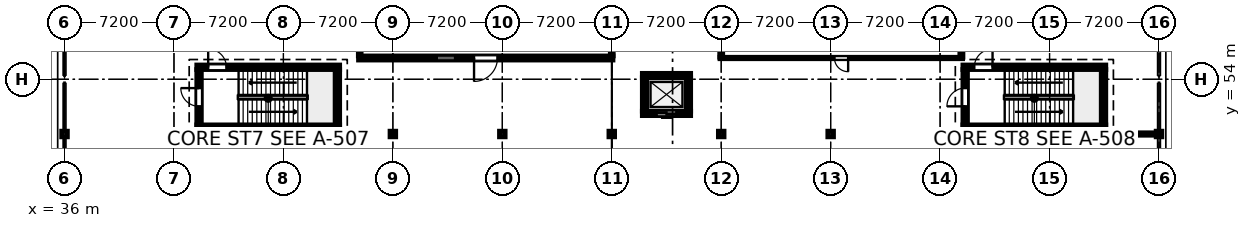
"""IFC4 building model, lengths in metres.
Left out: names, types, materials, properties, quantities, classifications, styles, units other than length and angle.
Written with IfcOpenShell. Run it as: python <this file> out.ifc"""

import sys

from ifc_helpers import new_model, si_unit, direction, frame, frame_2d, origin, origin_2d, place, context, subcontext, project, spatial, rectangle, i_section, extrude, element, fill, save


model = new_model("IFC4")
c1 = context("Model", 3, precision=1e-05, world=origin(), true_north=direction((0.0, 1.0)))
c2 = subcontext(c1, "Body", "Model", "MODEL_VIEW")
j1 = project(units=[si_unit("LENGTHUNIT", "METRE"), si_unit("PLANEANGLEUNIT", "RADIAN")], contexts=[c1])
p1 = place(None, origin())
s1 = spatial("IfcSite", under=j1, at=p1, CompositionType="ELEMENT")
p2 = place(p1, origin())
s2 = spatial("IfcBuilding", under=s1, at=p2, CompositionType="ELEMENT")
p3 = place(p2, origin())
s3 = spatial("IfcBuildingStorey", under=s2, at=p3, CompositionType="ELEMENT", Elevation=0.0)
for number, where, z_axis, x_axis in (
    (1, (36.0, 50.4, 0.0), (0.0, 0.0, 1.0), (1.0, 0.0, 0.0)),
    (2, (43.2, 50.4, 0.0), (0.0, 0.0, 1.0), (1.0, 0.0, 0.0)),
    (3, (50.4, 50.4, 0.0), (0.0, 0.0, 1.0), (1.0, 0.0, 0.0)),
    (4, (57.6, 50.4, 0.0), (0.0, 0.0, 1.0), (1.0, 0.0, 0.0)),
    (5, (64.8, 50.4, 0.0), (0.0, 0.0, 1.0), (1.0, 0.0, 0.0)),
    (6, (72.0, 50.4, 0.0), (0.0, 0.0, 1.0), (1.0, 0.0, 0.0)),
    (7, (79.2, 50.4, 0.0), (0.0, 0.0, 1.0), (1.0, 0.0, 0.0)),
    (8, (86.4, 50.4, 0.0), (0.0, 0.0, 1.0), (1.0, 0.0, 0.0)),
    (9, (93.6, 50.4, 0.0), (0.0, 0.0, 1.0), (1.0, 0.0, 0.0)),
    (10, (100.8, 50.4, 0.0), (0.0, 0.0, 1.0), (1.0, 0.0, 0.0)),
    (11, (108.0, 50.4, 0.0), (0.0, 0.0, 1.0), (1.0, 0.0, 0.0)),
):
    element("IfcColumn", number, at=place(p3, frame(where, z_axis=z_axis, x_axis=x_axis)), inside=s3, PredefinedType="COLUMN", context=c2, shape_type="SweptSolid", body=[
        extrude(i_section(OverallWidth=0.373, OverallDepth=0.373, WebThickness=0.016, FlangeThickness=0.026, FilletRadius=0.015, at=origin_2d()), origin(), (0.0, 0.0, 1.0), 5.4),
    ])
p4 = place(p3, frame((54.1, 50.85, 0.0), z_axis=(0.0, 0.0, 1.0), x_axis=(-1.0, 0.0, 0.0)))
e12 = element("IfcWall", 12, at=p4, inside=s3, PredefinedType="SOLIDWALL", context=c2, shape_type="SweptSolid", body=[
    extrude(rectangle(XDim=9.4, YDim=0.3, at=frame_2d((4.7, 0.0))), origin(), (0.0, 0.0, 1.0), 5.18),
])
p5 = place(p3, frame((44.7, 54.79, 0.0), z_axis=(0.0, 0.0, 1.0), x_axis=(1.0, 0.0, 0.0)))
e13 = element("IfcWall", 13, at=p5, inside=s3, PredefinedType="SOLIDWALL", context=c2, shape_type="SweptSolid", body=[
    extrude(rectangle(XDim=9.4, YDim=0.3, at=frame_2d((4.7, 0.0))), origin(), (0.0, 0.0, 1.0), 5.18),
])
p6 = place(p5, frame((0.75, 0.0, 0.0)))
e14 = element("IfcOpeningElement", 14, at=p6, cuts=e13, PredefinedType="OPENING", context=c2, shape_type="SweptSolid", body=[
    extrude(rectangle(XDim=1.2, YDim=2.2, at=frame_2d((0.6, 1.1))), frame((0.0, 0.16, 0.0), z_axis=(0.0, -1.0, 0.0), x_axis=(1.0, 0.0, 0.0)), (0.0, 0.0, 1.0), 0.32),
])
p7 = place(p3, frame((44.85, 51.0, 0.0), z_axis=(0.0, 0.0, 1.0), x_axis=(0.0, 1.0, 0.0)))
e15 = element("IfcWall", 15, at=p7, inside=s3, PredefinedType="SOLIDWALL", context=c2, shape_type="SweptSolid", body=[
    extrude(rectangle(XDim=3.64, YDim=0.3, at=frame_2d((1.82, 0.0))), origin(), (0.0, 0.0, 1.0), 5.18),
])
p8 = place(p7, frame((1.22, 0.0, 0.0)))
e16 = element("IfcOpeningElement", 16, at=p8, cuts=e15, PredefinedType="OPENING", context=c2, shape_type="SweptSolid", body=[
    extrude(rectangle(XDim=1.2, YDim=2.2, at=frame_2d((0.6, 1.1))), frame((0.0, 0.16, 0.0), z_axis=(0.0, -1.0, 0.0), x_axis=(1.0, 0.0, 0.0)), (0.0, 0.0, 1.0), 0.32),
])
p9 = place(p3, frame((53.95, 54.64, 0.0), z_axis=(0.0, 0.0, 1.0), x_axis=(0.0, -1.0, 0.0)))
e17 = element("IfcWall", 17, at=p9, inside=s3, PredefinedType="SOLIDWALL", context=c2, shape_type="SweptSolid", body=[
    extrude(rectangle(XDim=3.64, YDim=0.3, at=frame_2d((1.82, 0.0))), origin(), (0.0, 0.0, 1.0), 5.18),
])
p10 = place(p3, frame((104.5, 50.85, 0.0), z_axis=(0.0, 0.0, 1.0), x_axis=(-1.0, 0.0, 0.0)))
e18 = element("IfcWall", 18, at=p10, inside=s3, PredefinedType="SOLIDWALL", context=c2, shape_type="SweptSolid", body=[
    extrude(rectangle(XDim=9.4, YDim=0.3, at=frame_2d((4.7, 0.0))), origin(), (0.0, 0.0, 1.0), 5.18),
])
p11 = place(p3, frame((95.1, 54.79, 0.0), z_axis=(0.0, 0.0, 1.0), x_axis=(1.0, 0.0, 0.0)))
e19 = element("IfcWall", 19, at=p11, inside=s3, PredefinedType="SOLIDWALL", context=c2, shape_type="SweptSolid", body=[
    extrude(rectangle(XDim=9.4, YDim=0.3, at=frame_2d((4.7, 0.0))), origin(), (0.0, 0.0, 1.0), 5.18),
])
p12 = place(p11, frame((0.75, 0.0, 0.0)))
e20 = element("IfcOpeningElement", 20, at=p12, cuts=e19, PredefinedType="OPENING", context=c2, shape_type="SweptSolid", body=[
    extrude(rectangle(XDim=1.2, YDim=2.2, at=frame_2d((0.6, 1.1))), frame((0.0, 0.16, 0.0), z_axis=(0.0, -1.0, 0.0), x_axis=(1.0, 0.0, 0.0)), (0.0, 0.0, 1.0), 0.32),
])
p13 = place(p3, frame((95.25, 51.0, 0.0), z_axis=(0.0, 0.0, 1.0), x_axis=(0.0, 1.0, 0.0)))
e21 = element("IfcWall", 21, at=p13, inside=s3, PredefinedType="SOLIDWALL", context=c2, shape_type="SweptSolid", body=[
    extrude(rectangle(XDim=3.64, YDim=0.3, at=frame_2d((1.82, 0.0))), origin(), (0.0, 0.0, 1.0), 5.18),
])
p14 = place(p13, frame((1.22, 0.0, 0.0)))
e22 = element("IfcOpeningElement", 22, at=p14, cuts=e21, PredefinedType="OPENING", context=c2, shape_type="SweptSolid", body=[
    extrude(rectangle(XDim=1.2, YDim=2.2, at=frame_2d((0.6, 1.1))), frame((0.0, 0.16, 0.0), z_axis=(0.0, -1.0, 0.0), x_axis=(1.0, 0.0, 0.0)), (0.0, 0.0, 1.0), 0.32),
])
p15 = place(p3, frame((104.35, 54.64, 0.0), z_axis=(0.0, 0.0, 1.0), x_axis=(0.0, -1.0, 0.0)))
e23 = element("IfcWall", 23, at=p15, inside=s3, PredefinedType="SOLIDWALL", context=c2, shape_type="SweptSolid", body=[
    extrude(rectangle(XDim=3.64, YDim=0.3, at=frame_2d((1.82, 0.0))), origin(), (0.0, 0.0, 1.0), 5.18),
])
p16 = place(p3, frame((77.19, 51.755, 0.0), z_axis=(0.0, 0.0, 1.0), x_axis=(-1.0, 0.0, 0.0)))
e24 = element("IfcWall", 24, at=p16, inside=s3, PredefinedType="SHEAR", context=c2, shape_type="SweptSolid", body=[
    extrude(rectangle(XDim=3.18, YDim=0.29, at=frame_2d((1.59, 0.0))), origin(), (0.0, 0.0, 1.0), 5.18),
])
p17 = place(p16, frame((0.94, 0.0, 0.0)))
e25 = element("IfcOpeningElement", 25, at=p17, cuts=e24, PredefinedType="OPENING", context=c2, shape_type="SweptSolid", body=[
    extrude(rectangle(XDim=1.3, YDim=2.2, at=frame_2d((0.65, 1.1))), frame((0.0, 0.155, 0.0), z_axis=(0.0, -1.0, 0.0), x_axis=(1.0, 0.0, 0.0)), (0.0, 0.0, 1.0), 0.31),
])
p18 = place(p3, frame((74.01, 54.245, 0.0), z_axis=(0.0, 0.0, 1.0), x_axis=(1.0, 0.0, 0.0)))
e26 = element("IfcWall", 26, at=p18, inside=s3, PredefinedType="SHEAR", context=c2, shape_type="SweptSolid", body=[
    extrude(rectangle(XDim=3.18, YDim=0.29, at=frame_2d((1.59, 0.0))), origin(), (0.0, 0.0, 1.0), 5.18),
])
for number, where, z_axis, x_axis in (
    (27, (74.155, 51.9, 0.0), (0.0, 0.0, 1.0), (0.0, 1.0, 0.0)),
    (28, (77.045, 54.1, 0.0), (0.0, 0.0, 1.0), (0.0, -1.0, 0.0)),
):
    element("IfcWall", number, at=place(p3, frame(where, z_axis=z_axis, x_axis=x_axis)), inside=s3, PredefinedType="SHEAR", context=c2, shape_type="SweptSolid", body=[
        extrude(rectangle(XDim=2.2, YDim=0.29, at=frame_2d((1.1, 0.0))), origin(), (0.0, 0.0, 1.0), 5.18),
    ])
p19 = place(p3, frame((72.08, 55.4, 0.0), z_axis=(0.0, 0.0, 1.0), x_axis=(-1.0, 0.0, 0.0)))
e29 = element("IfcWall", 29, at=p19, inside=s3, PredefinedType="PARTITIONING", context=c2, shape_type="SweptSolid", body=[
    extrude(rectangle(XDim=16.74, YDim=0.27, at=frame_2d((8.37, 0.0))), origin(), (0.0, 0.0, 1.0), 4.477),
])
p20 = place(p19, frame((7.6, 0.0, 0.0)))
e30 = element("IfcOpeningElement", 30, at=p20, cuts=e29, PredefinedType="OPENING", context=c2, shape_type="SweptSolid", body=[
    extrude(rectangle(XDim=1.54, YDim=2.1, at=frame_2d((0.77, 1.05))), frame((0.0, 0.145, 0.0), z_axis=(0.0, -1.0, 0.0), x_axis=(1.0, 0.0, 0.0)), (0.0, 0.0, 1.0), 0.29),
])
p21 = place(p19, frame((10.39, 0.0, 0.95)))
e31 = element("IfcOpeningElement", 31, at=p21, cuts=e29, PredefinedType="OPENING", context=c2, shape_type="SweptSolid", body=[
    extrude(rectangle(XDim=1.2, YDim=1.0, at=frame_2d((0.6, 0.5))), frame((0.0, 0.145, 0.0), z_axis=(0.0, -1.0, 0.0), x_axis=(1.0, 0.0, 0.0)), (0.0, 0.0, 1.0), 0.29),
])
p22 = place(p3, frame((95.08, 55.4, 0.0), z_axis=(0.0, 0.0, 1.0), x_axis=(-1.0, 0.0, 0.0)))
e32 = element("IfcWall", 32, at=p22, inside=s3, PredefinedType="PARTITIONING", context=c2, shape_type="SweptSolid", body=[
    extrude(rectangle(XDim=15.96, YDim=0.095, at=frame_2d((7.98, 0.0))), origin(), (0.0, 0.0, 1.0), 4.477),
])
p23 = place(p22, frame((7.53, 0.0, 0.0)))
e33 = element("IfcOpeningElement", 33, at=p23, cuts=e32, PredefinedType="OPENING", context=c2, shape_type="SweptSolid", body=[
    extrude(rectangle(XDim=0.9, YDim=2.16, at=frame_2d((0.45, 1.08))), frame((0.0, 0.057, 0.0), z_axis=(0.0, -1.0, 0.0), x_axis=(1.0, 0.0, 0.0)), (0.0, 0.0, 1.0), 0.115),
])
p24 = place(p3, frame((100.72, 50.4, 0.0), z_axis=(0.0, 0.0, 1.0), x_axis=(1.0, 0.0, 0.0)))
e34 = element("IfcWall", 34, at=p24, inside=s3, PredefinedType="PARTITIONING", context=c2, shape_type="SweptSolid", body=[
    extrude(rectangle(XDim=7.198, YDim=0.16, at=frame_2d((3.599, 0.0))), origin(), (0.0, 0.0, 1.0), 4.477),
])
p25 = place(p3, frame((100.8, 18.08, 0.0), z_axis=(0.0, 0.0, 1.0), x_axis=(0.0, 1.0, 0.0)))
e35 = element("IfcWall", 35, at=p25, inside=s3, PredefinedType="PARTITIONING", context=c2, shape_type="SweptSolid", body=[
    extrude(rectangle(XDim=32.238, YDim=0.13, at=frame_2d((16.119, 0.0))), origin(), (0.0, 0.0, 1.0), 4.477),
])
p26 = place(p25, frame((15.639, 0.0, 0.0)))
e36 = element("IfcOpeningElement", 36, at=p26, cuts=e35, PredefinedType="OPENING", context=c2, shape_type="SweptSolid", body=[
    extrude(rectangle(XDim=0.96, YDim=2.16, at=frame_2d((0.48, 1.08))), frame((0.0, 0.075, 0.0), z_axis=(0.0, -1.0, 0.0), x_axis=(1.0, 0.0, 0.0)), (0.0, 0.0, 1.0), 0.15),
])
p27 = place(p25, frame((17.849, 0.0, 0.95)))
e37 = element("IfcOpeningElement", 37, at=p27, cuts=e35, PredefinedType="OPENING", context=c2, shape_type="SweptSolid", body=[
    extrude(rectangle(XDim=1.4, YDim=1.0, at=frame_2d((0.7, 0.5))), frame((0.0, 0.075, 0.0), z_axis=(0.0, -1.0, 0.0), x_axis=(1.0, 0.0, 0.0)), (0.0, 0.0, 1.0), 0.15),
])
p28 = place(p3, frame((55.42, 55.537, 0.0), z_axis=(0.0, 0.0, 1.0), x_axis=(0.0, 1.0, 0.0)))
e38 = element("IfcWall", 38, at=p28, inside=s3, PredefinedType="PARTITIONING", context=c2, shape_type="SweptSolid", body=[
    extrude(rectangle(XDim=4.381, YDim=0.185, at=frame_2d((2.19, 0.0))), origin(), (0.0, 0.0, 1.0), 4.477),
])
p29 = place(p3, frame((72.0, 59.918, 0.0), z_axis=(0.0, 0.0, 1.0), x_axis=(0.0, -1.0, 0.0)))
e39 = element("IfcWall", 39, at=p29, inside=s3, PredefinedType="PARTITIONING", context=c2, shape_type="SweptSolid", body=[
    extrude(rectangle(XDim=4.381, YDim=0.192, at=frame_2d((2.19, 0.0))), origin(), (0.0, 0.0, 1.0), 4.477),
])
p30 = place(p3, frame((79.2, 55.45, 0.0), z_axis=(0.0, 0.0, 1.0), x_axis=(0.0, 1.0, 0.0)))
e40 = element("IfcWall", 40, at=p30, inside=s3, PredefinedType="PARTITIONING", context=c2, shape_type="SweptSolid", body=[
    extrude(rectangle(XDim=4.468, YDim=0.198, at=frame_2d((2.234, 0.0))), origin(), (0.0, 0.0, 1.0), 4.477),
])
p31 = place(p3, frame((95.0, 59.858, 0.0), z_axis=(0.0, 0.0, 1.0), x_axis=(0.0, -1.0, 0.0)))
e41 = element("IfcWall", 41, at=p31, inside=s3, PredefinedType="PARTITIONING", context=c2, shape_type="SweptSolid", body=[
    extrude(rectangle(XDim=4.408, YDim=0.205, at=frame_2d((2.204, 0.0))), origin(), (0.0, 0.0, 1.0), 4.477),
])
p32 = place(p6, origin())
e42 = element("IfcDoor", 42, at=p32, inside=s3, OperationType="SINGLE_SWING_LEFT", PredefinedType="DOOR", context=c2, shape_type="SweptSolid", body=[
    extrude(rectangle(XDim=1.2, YDim=2.2, at=frame_2d((0.6, 1.1))), frame((0.0, 0.025, 0.0), z_axis=(0.0, -1.0, 0.0), x_axis=(1.0, 0.0, 0.0)), (0.0, 0.0, 1.0), 0.05),
])
fill(e14, e42)
p33 = place(p8, origin())
e43 = element("IfcDoor", 43, at=p33, inside=s3, OperationType="SINGLE_SWING_RIGHT", PredefinedType="DOOR", context=c2, shape_type="SweptSolid", body=[
    extrude(rectangle(XDim=1.2, YDim=2.2, at=frame_2d((0.6, 1.1))), frame((0.0, 0.025, 0.0), z_axis=(0.0, -1.0, 0.0), x_axis=(1.0, 0.0, 0.0)), (0.0, 0.0, 1.0), 0.05),
])
fill(e16, e43)
p34 = place(p12, origin())
e44 = element("IfcDoor", 44, at=p34, inside=s3, OperationType="SINGLE_SWING_RIGHT", PredefinedType="DOOR", context=c2, shape_type="SweptSolid", body=[
    extrude(rectangle(XDim=1.2, YDim=2.2, at=frame_2d((0.6, 1.1))), frame((0.0, 0.025, 0.0), z_axis=(0.0, -1.0, 0.0), x_axis=(1.0, 0.0, 0.0)), (0.0, 0.0, 1.0), 0.05),
])
fill(e20, e44)
p35 = place(p14, origin())
e45 = element("IfcDoor", 45, at=p35, inside=s3, OperationType="SINGLE_SWING_LEFT", PredefinedType="DOOR", context=c2, shape_type="SweptSolid", body=[
    extrude(rectangle(XDim=1.2, YDim=2.2, at=frame_2d((0.6, 1.1))), frame((0.0, 0.025, 0.0), z_axis=(0.0, -1.0, 0.0), x_axis=(1.0, 0.0, 0.0)), (0.0, 0.0, 1.0), 0.05),
])
fill(e22, e45)
p36 = place(p17, origin())
e46 = element("IfcDoor", 46, at=p36, inside=s3, OperationType="DOUBLE_DOOR_SLIDING", PredefinedType="DOOR", context=c2, shape_type="SweptSolid", body=[
    extrude(rectangle(XDim=1.3, YDim=2.2, at=frame_2d((0.65, 1.1))), frame((0.0, 0.025, 0.0), z_axis=(0.0, -1.0, 0.0), x_axis=(1.0, 0.0, 0.0)), (0.0, 0.0, 1.0), 0.05),
])
fill(e25, e46)
p37 = place(p20, origin())
e47 = element("IfcDoor", 47, at=p37, inside=s3, OperationType="SINGLE_SWING_RIGHT", PredefinedType="DOOR", context=c2, shape_type="SweptSolid", body=[
    extrude(rectangle(XDim=1.54, YDim=2.1, at=frame_2d((0.77, 1.05))), frame((0.0, 0.025, 0.0), z_axis=(0.0, -1.0, 0.0), x_axis=(1.0, 0.0, 0.0)), (0.0, 0.0, 1.0), 0.05),
])
fill(e30, e47)
p38 = place(p21, origin())
e48 = element("IfcWindow", 48, at=p38, inside=s3, PartitioningType="SINGLE_PANEL", PredefinedType="WINDOW", context=c2, shape_type="SweptSolid", body=[
    extrude(rectangle(XDim=1.2, YDim=1.0, at=frame_2d((0.6, 0.5))), frame((0.0, 0.03, 0.0), z_axis=(0.0, -1.0, 0.0), x_axis=(1.0, 0.0, 0.0)), (0.0, 0.0, 1.0), 0.06),
])
fill(e31, e48)
p39 = place(p23, origin())
e49 = element("IfcDoor", 49, at=p39, inside=s3, OperationType="SINGLE_SWING_LEFT", PredefinedType="DOOR", context=c2, shape_type="SweptSolid", body=[
    extrude(rectangle(XDim=0.9, YDim=2.16, at=frame_2d((0.45, 1.08))), frame((0.0, 0.025, 0.0), z_axis=(0.0, -1.0, 0.0), x_axis=(1.0, 0.0, 0.0)), (0.0, 0.0, 1.0), 0.05),
])
fill(e33, e49)
save(model, sys.argv[1])
